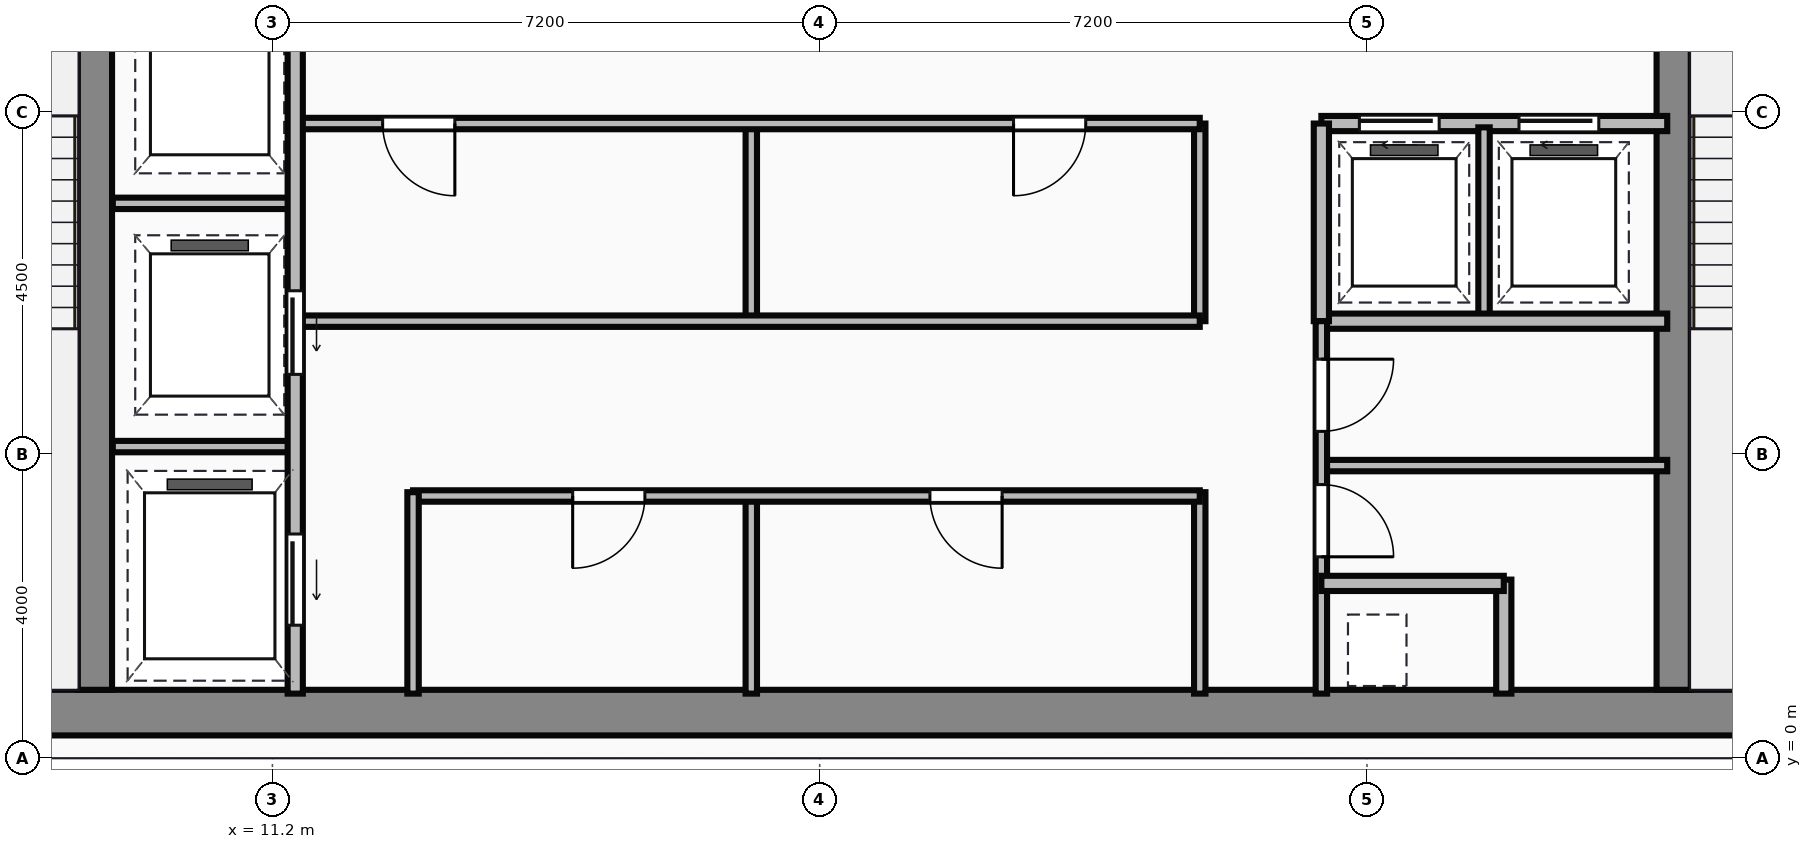
"""IFC4 building model, lengths in metres.
Left out: names, types, materials, properties, quantities, classifications, styles, units other than length and angle.
Written with IfcOpenShell. Run it as: python <this file> out.ifc"""

import sys

from ifc_helpers import new_model, si_unit, direction, frame, frame_2d, origin, place, context, subcontext, project, spatial, rectangle, extrude, source, transform, mapped, element, fill, save


model = new_model("IFC4")
c1 = context("Model", 3, precision=1e-05, world=origin(), true_north=direction((0.0, 1.0)))
c2 = subcontext(c1, "Body", "Model", "MODEL_VIEW")
j1 = project(units=[si_unit("LENGTHUNIT", "METRE"), si_unit("PLANEANGLEUNIT", "RADIAN")], contexts=[c1])
p1 = place(None, origin())
s1 = spatial("IfcSite", under=j1, at=p1, CompositionType="ELEMENT")
p2 = place(p1, origin())
s2 = spatial("IfcBuilding", under=s1, at=p2, CompositionType="ELEMENT")
p3 = place(p2, frame((0.0, 0.0, 203.2)))
s3 = spatial("IfcBuildingStorey", under=s2, at=p3, CompositionType="ELEMENT", Elevation=203.2)
m1 = source(origin(), c2, "Body", "SweptSolid", [
    extrude(rectangle(XDim=29.5, YDim=0.6, at=frame_2d((14.75, 0.0))), origin(), (0.0, 0.0, 1.0), 3.65),
])
p4 = place(p3, frame((4.5, 0.6, 0.0), z_axis=(0.0, 0.0, 1.0), x_axis=(1.0, 0.0, 0.0)))
e1 = element("IfcWall", 1, at=p4, inside=s3, PredefinedType="SHEAR", context=c2, shape_type="MappedRepresentation", body=[
    mapped(m1, transform((0.0, 0.0, 0.0))),
])
m2 = source(origin(), c2, "Body", "SweptSolid", [
    extrude(rectangle(XDim=12.5, YDim=0.45, at=frame_2d((6.25, 0.0))), origin(), (0.0, 0.0, 1.0), 3.65),
])
for number, where, z_axis, x_axis in (
    (2, (8.865, 0.9, 0.0), (0.0, 0.0, 1.0), (0.0, 1.0, 0.0)),
    (3, (29.635, 0.9, 0.0), (0.0, 0.0, 1.0), (0.0, 1.0, 0.0)),
):
    element("IfcWall", number, at=place(p3, frame(where, z_axis=z_axis, x_axis=x_axis)), inside=s3, PredefinedType="SHEAR", context=c2, shape_type="MappedRepresentation", body=[
        mapped(m2, transform((0.0, 0.0, 0.0))),
    ])
m3 = source(origin(), c2, "Body", "SweptSolid", [
    extrude(rectangle(XDim=9.6, YDim=0.2, at=frame_2d((4.8, 0.0))), origin(), (0.0, 0.0, 1.0), 3.4),
])
p5 = place(p3, frame((11.5, 0.85, 0.0), z_axis=(0.0, 0.0, 1.0), x_axis=(0.0, 1.0, 0.0)))
e4 = element("IfcWall", 4, at=p5, inside=s3, PredefinedType="PARTITIONING", context=c2, shape_type="MappedRepresentation", body=[
    mapped(m3, transform((0.0, 0.0, 0.0))),
])
p6 = place(p5, frame((4.2, 0.0, 0.0)))
e5 = element("IfcOpeningElement", 5, at=p6, cuts=e4, PredefinedType="OPENING", context=c2, shape_type="SweptSolid", body=[
    extrude(rectangle(XDim=1.1, YDim=2.15, at=frame_2d((0.55, 1.075))), frame((0.0, 0.11, 0.0), z_axis=(0.0, -1.0, 0.0), x_axis=(1.0, 0.0, 0.0)), (0.0, 0.0, 1.0), 0.22),
])
p7 = place(p5, frame((0.9, 0.0, 0.0)))
e6 = element("IfcOpeningElement", 6, at=p7, cuts=e4, PredefinedType="OPENING", context=c2, shape_type="SweptSolid", body=[
    extrude(rectangle(XDim=1.2, YDim=2.15, at=frame_2d((0.6, 1.075))), frame((0.0, 0.11, 0.0), z_axis=(0.0, -1.0, 0.0), x_axis=(1.0, 0.0, 0.0)), (0.0, 0.0, 1.0), 0.22),
])
m4 = source(origin(), c2, "Body", "SweptSolid", [
    extrude(rectangle(XDim=2.4, YDim=0.15, at=frame_2d((1.2, 0.0))), origin(), (0.0, 0.0, 1.0), 3.4),
])
for number, where, z_axis, x_axis in (
    (7, (9.1, 4.1, 0.0), (0.0, 0.0, 1.0), (1.0, 0.0, 0.0)),
    (8, (9.1, 7.3, 0.0), (0.0, 0.0, 1.0), (1.0, 0.0, 0.0)),
):
    element("IfcWall", number, at=place(p3, frame(where, z_axis=z_axis, x_axis=x_axis)), inside=s3, PredefinedType="PARTITIONING", context=c2, shape_type="MappedRepresentation", body=[
        mapped(m4, transform((0.0, 0.0, 0.0))),
    ])
m5 = source(origin(), c2, "Body", "SweptSolid", [
    extrude(rectangle(XDim=2.65, YDim=0.15, at=frame_2d((1.325, 0.0))), origin(), (0.0, 0.0, 1.0), 3.4),
])
p8 = place(p3, frame((13.05, 0.85, 0.0), z_axis=(0.0, 0.0, 1.0), x_axis=(0.0, 1.0, 0.0)))
e9 = element("IfcWall", 9, at=p8, inside=s3, PredefinedType="PARTITIONING", context=c2, shape_type="MappedRepresentation", body=[
    mapped(m5, transform((0.0, 0.0, 0.0))),
])
m6 = source(origin(), c2, "Body", "SweptSolid", [
    extrude(rectangle(XDim=10.35, YDim=0.15, at=frame_2d((5.175, 0.0))), origin(), (0.0, 0.0, 1.0), 3.4),
])
p9 = place(p3, frame((13.05, 3.45, 0.0), z_axis=(0.0, 0.0, 1.0), x_axis=(1.0, 0.0, 0.0)))
e10 = element("IfcWall", 10, at=p9, inside=s3, PredefinedType="PARTITIONING", context=c2, shape_type="MappedRepresentation", body=[
    mapped(m6, transform((0.0, 0.0, 0.0))),
])
p10 = place(p9, frame((2.1, 0.0, 0.0)))
e11 = element("IfcOpeningElement", 11, at=p10, cuts=e10, PredefinedType="OPENING", context=c2, shape_type="SweptSolid", body=[
    extrude(rectangle(XDim=0.95, YDim=2.15, at=frame_2d((0.475, 1.075))), frame((0.0, 0.085, 0.0), z_axis=(0.0, -1.0, 0.0), x_axis=(1.0, 0.0, 0.0)), (0.0, 0.0, 1.0), 0.17),
])
p11 = place(p9, frame((6.8, 0.0, 0.0)))
e12 = element("IfcOpeningElement", 12, at=p11, cuts=e10, PredefinedType="OPENING", context=c2, shape_type="SweptSolid", body=[
    extrude(rectangle(XDim=0.95, YDim=2.15, at=frame_2d((0.475, 1.075))), frame((0.0, 0.085, 0.0), z_axis=(0.0, -1.0, 0.0), x_axis=(1.0, 0.0, 0.0)), (0.0, 0.0, 1.0), 0.17),
])
p12 = place(p3, frame((23.4, 0.85, 0.0), z_axis=(0.0, 0.0, 1.0), x_axis=(0.0, 1.0, 0.0)))
e13 = element("IfcWall", 13, at=p12, inside=s3, PredefinedType="PARTITIONING", context=c2, shape_type="MappedRepresentation", body=[
    mapped(m5, transform((0.0, 0.0, 0.0))),
])
m7 = source(origin(), c2, "Body", "SweptSolid", [
    extrude(rectangle(XDim=2.6, YDim=0.15, at=frame_2d((1.3, 0.0))), origin(), (0.0, 0.0, 1.0), 3.4),
])
p13 = place(p3, frame((17.5, 0.85, 0.0), z_axis=(0.0, 0.0, 1.0), x_axis=(0.0, 1.0, 0.0)))
e14 = element("IfcWall", 14, at=p13, inside=s3, PredefinedType="PARTITIONING", context=c2, shape_type="MappedRepresentation", body=[
    mapped(m7, transform((0.0, 0.0, 0.0))),
])
m8 = source(origin(), c2, "Body", "SweptSolid", [
    extrude(rectangle(XDim=11.85, YDim=0.15, at=frame_2d((5.925, 0.0))), origin(), (0.0, 0.0, 1.0), 3.4),
])
p14 = place(p3, frame((11.55, 5.75, 0.0), z_axis=(0.0, 0.0, 1.0), x_axis=(1.0, 0.0, 0.0)))
e15 = element("IfcWall", 15, at=p14, inside=s3, PredefinedType="PARTITIONING", context=c2, shape_type="MappedRepresentation", body=[
    mapped(m8, transform((0.0, 0.0, 0.0))),
])
p15 = place(p3, frame((11.55, 8.35, 0.0), z_axis=(0.0, 0.0, 1.0), x_axis=(1.0, 0.0, 0.0)))
e16 = element("IfcWall", 16, at=p15, inside=s3, PredefinedType="PARTITIONING", context=c2, shape_type="MappedRepresentation", body=[
    mapped(m8, transform((0.0, 0.0, 0.0))),
])
p16 = place(p15, frame((1.1, 0.0, 0.0)))
e17 = element("IfcOpeningElement", 17, at=p16, cuts=e16, PredefinedType="OPENING", context=c2, shape_type="SweptSolid", body=[
    extrude(rectangle(XDim=0.95, YDim=2.15, at=frame_2d((0.475, 1.075))), frame((0.0, 0.085, 0.0), z_axis=(0.0, -1.0, 0.0), x_axis=(1.0, 0.0, 0.0)), (0.0, 0.0, 1.0), 0.17),
])
p17 = place(p15, frame((9.4, 0.0, 0.0)))
e18 = element("IfcOpeningElement", 18, at=p17, cuts=e16, PredefinedType="OPENING", context=c2, shape_type="SweptSolid", body=[
    extrude(rectangle(XDim=0.95, YDim=2.15, at=frame_2d((0.475, 1.075))), frame((0.0, 0.085, 0.0), z_axis=(0.0, -1.0, 0.0), x_axis=(1.0, 0.0, 0.0)), (0.0, 0.0, 1.0), 0.17),
])
m9 = source(origin(), c2, "Body", "SweptSolid", [
    extrude(rectangle(XDim=2.6, YDim=0.15, at=frame_2d((1.3, 0.0))), origin(), (0.0, 0.0, 1.0), 3.4),
])
p18 = place(p3, frame((23.4, 5.75, 0.0), z_axis=(0.0, 0.0, 1.0), x_axis=(0.0, 1.0, 0.0)))
e19 = element("IfcWall", 19, at=p18, inside=s3, PredefinedType="PARTITIONING", context=c2, shape_type="MappedRepresentation", body=[
    mapped(m9, transform((0.0, 0.0, 0.0))),
])
m10 = source(origin(), c2, "Body", "SweptSolid", [
    extrude(rectangle(XDim=2.5, YDim=0.15, at=frame_2d((1.25, 0.0))), origin(), (0.0, 0.0, 1.0), 3.4),
])
p19 = place(p3, frame((17.5, 5.8, 0.0), z_axis=(0.0, 0.0, 1.0), x_axis=(0.0, 1.0, 0.0)))
e20 = element("IfcWall", 20, at=p19, inside=s3, PredefinedType="PARTITIONING", context=c2, shape_type="MappedRepresentation", body=[
    mapped(m10, transform((0.0, 0.0, 0.0))),
])
m11 = source(origin(), c2, "Body", "SweptSolid", [
    extrude(rectangle(XDim=4.55, YDim=0.2, at=frame_2d((2.275, 0.0))), origin(), (0.0, 0.0, 1.0), 3.4),
])
p20 = place(p3, frame((25.0, 8.35, 0.0), z_axis=(0.0, 0.0, 1.0), x_axis=(1.0, 0.0, 0.0)))
e21 = element("IfcWall", 21, at=p20, inside=s3, PredefinedType="PARTITIONING", context=c2, shape_type="MappedRepresentation", body=[
    mapped(m11, transform((0.0, 0.0, 0.0))),
])
p21 = place(p20, frame((0.5, 0.0, 0.0)))
e22 = element("IfcOpeningElement", 22, at=p21, cuts=e21, PredefinedType="OPENING", context=c2, shape_type="SweptSolid", body=[
    extrude(rectangle(XDim=1.05, YDim=2.15, at=frame_2d((0.525, 1.075))), frame((0.0, 0.11, 0.0), z_axis=(0.0, -1.0, 0.0), x_axis=(1.0, 0.0, 0.0)), (0.0, 0.0, 1.0), 0.22),
])
p22 = place(p20, frame((2.6, 0.0, 0.0)))
e23 = element("IfcOpeningElement", 23, at=p22, cuts=e21, PredefinedType="OPENING", context=c2, shape_type="SweptSolid", body=[
    extrude(rectangle(XDim=1.05, YDim=2.15, at=frame_2d((0.525, 1.075))), frame((0.0, 0.11, 0.0), z_axis=(0.0, -1.0, 0.0), x_axis=(1.0, 0.0, 0.0)), (0.0, 0.0, 1.0), 0.22),
])
p23 = place(p3, frame((25.0, 5.75, 0.0), z_axis=(0.0, 0.0, 1.0), x_axis=(1.0, 0.0, 0.0)))
e24 = element("IfcWall", 24, at=p23, inside=s3, PredefinedType="PARTITIONING", context=c2, shape_type="MappedRepresentation", body=[
    mapped(m11, transform((0.0, 0.0, 0.0))),
])
m12 = source(origin(), c2, "Body", "SweptSolid", [
    extrude(rectangle(XDim=2.6, YDim=0.2, at=frame_2d((1.3, 0.0))), origin(), (0.0, 0.0, 1.0), 3.4),
])
p24 = place(p3, frame((25.0, 5.75, 0.0), z_axis=(0.0, 0.0, 1.0), x_axis=(0.0, 1.0, 0.0)))
e25 = element("IfcWall", 25, at=p24, inside=s3, PredefinedType="PARTITIONING", context=c2, shape_type="MappedRepresentation", body=[
    mapped(m12, transform((0.0, 0.0, 0.0))),
])
p25 = place(p3, frame((27.14, 5.8, 0.0), z_axis=(0.0, 0.0, 1.0), x_axis=(0.0, 1.0, 0.0)))
e26 = element("IfcWall", 26, at=p25, inside=s3, PredefinedType="PARTITIONING", context=c2, shape_type="MappedRepresentation", body=[
    mapped(m10, transform((0.0, 0.0, 0.0))),
])
m13 = source(origin(), c2, "Body", "SweptSolid", [
    extrude(rectangle(XDim=4.9, YDim=0.15, at=frame_2d((2.45, 0.0))), origin(), (0.0, 0.0, 1.0), 3.4),
])
p26 = place(p3, frame((25.0, 0.85, 0.0), z_axis=(0.0, 0.0, 1.0), x_axis=(0.0, 1.0, 0.0)))
e27 = element("IfcWall", 27, at=p26, inside=s3, PredefinedType="PARTITIONING", context=c2, shape_type="MappedRepresentation", body=[
    mapped(m13, transform((0.0, 0.0, 0.0))),
])
p27 = place(p26, frame((1.8, 0.0, 0.0)))
e28 = element("IfcOpeningElement", 28, at=p27, cuts=e27, PredefinedType="OPENING", context=c2, shape_type="SweptSolid", body=[
    extrude(rectangle(XDim=0.95, YDim=2.15, at=frame_2d((0.475, 1.075))), frame((0.0, 0.085, 0.0), z_axis=(0.0, -1.0, 0.0), x_axis=(1.0, 0.0, 0.0)), (0.0, 0.0, 1.0), 0.17),
])
p28 = place(p26, frame((3.45, 0.0, 0.0)))
e29 = element("IfcOpeningElement", 29, at=p28, cuts=e27, PredefinedType="OPENING", context=c2, shape_type="SweptSolid", body=[
    extrude(rectangle(XDim=0.95, YDim=2.15, at=frame_2d((0.475, 1.075))), frame((0.0, 0.085, 0.0), z_axis=(0.0, -1.0, 0.0), x_axis=(1.0, 0.0, 0.0)), (0.0, 0.0, 1.0), 0.17),
])
m14 = source(origin(), c2, "Body", "SweptSolid", [
    extrude(rectangle(XDim=2.4, YDim=0.2, at=frame_2d((1.2, 0.0))), origin(), (0.0, 0.0, 1.0), 3.4),
])
p29 = place(p3, frame((25.0, 2.3, 0.0), z_axis=(0.0, 0.0, 1.0), x_axis=(1.0, 0.0, 0.0)))
e30 = element("IfcWall", 30, at=p29, inside=s3, PredefinedType="PARTITIONING", context=c2, shape_type="MappedRepresentation", body=[
    mapped(m14, transform((0.0, 0.0, 0.0))),
])
m15 = source(origin(), c2, "Body", "SweptSolid", [
    extrude(rectangle(XDim=1.5, YDim=0.2, at=frame_2d((0.75, 0.0))), origin(), (0.0, 0.0, 1.0), 3.4),
])
p30 = place(p3, frame((27.4, 0.85, 0.0), z_axis=(0.0, 0.0, 1.0), x_axis=(0.0, 1.0, 0.0)))
e31 = element("IfcWall", 31, at=p30, inside=s3, PredefinedType="PARTITIONING", context=c2, shape_type="MappedRepresentation", body=[
    mapped(m15, transform((0.0, 0.0, 0.0))),
])
m16 = source(origin(), c2, "Body", "SweptSolid", [
    extrude(rectangle(XDim=4.55, YDim=0.15, at=frame_2d((2.275, 0.0))), origin(), (0.0, 0.0, 1.0), 3.4),
])
p31 = place(p3, frame((25.0, 3.85, 0.0), z_axis=(0.0, 0.0, 1.0), x_axis=(1.0, 0.0, 0.0)))
e32 = element("IfcWall", 32, at=p31, inside=s3, PredefinedType="PARTITIONING", context=c2, shape_type="MappedRepresentation", body=[
    mapped(m16, transform((0.0, 0.0, 0.0))),
])
m17 = source(origin(), c2, "Body", "SweptSolid", [
    extrude(rectangle(XDim=1.1, YDim=2.15, at=frame_2d((0.55, 1.075))), frame((0.0, 0.025, 0.0), z_axis=(0.0, -1.0, 0.0), x_axis=(1.0, 0.0, 0.0)), (0.0, 0.0, 1.0), 0.05),
])
p32 = place(p6, frame((1.1, 0.0, 0.0), z_axis=(0.0, 0.0, 1.0), x_axis=(-1.0, 0.0, 0.0)))
e33 = element("IfcDoor", 33, at=p32, inside=s3, OperationType="SLIDING_TO_LEFT", PredefinedType="DOOR", context=c2, shape_type="MappedRepresentation", body=[
    mapped(m17, transform((0.0, 0.0, 0.0))),
])
fill(e5, e33)
m18 = source(origin(), c2, "Body", "SweptSolid", [
    extrude(rectangle(XDim=1.2, YDim=2.15, at=frame_2d((0.6, 1.075))), frame((0.0, 0.025, 0.0), z_axis=(0.0, -1.0, 0.0), x_axis=(1.0, 0.0, 0.0)), (0.0, 0.0, 1.0), 0.05),
])
p33 = place(p7, frame((1.2, 0.0, 0.0), z_axis=(0.0, 0.0, 1.0), x_axis=(-1.0, 0.0, 0.0)))
e34 = element("IfcDoor", 34, at=p33, inside=s3, OperationType="SLIDING_TO_LEFT", PredefinedType="DOOR", context=c2, shape_type="MappedRepresentation", body=[
    mapped(m18, transform((0.0, 0.0, 0.0))),
])
fill(e6, e34)
m19 = source(origin(), c2, "Body", "SweptSolid", [
    extrude(rectangle(XDim=0.95, YDim=2.15, at=frame_2d((0.475, 1.075))), frame((0.0, 0.025, 0.0), z_axis=(0.0, -1.0, 0.0), x_axis=(1.0, 0.0, 0.0)), (0.0, 0.0, 1.0), 0.05),
])
p34 = place(p10, origin())
e35 = element("IfcDoor", 35, at=p34, inside=s3, OperationType="SINGLE_SWING_LEFT", PredefinedType="DOOR", context=c2, shape_type="MappedRepresentation", body=[
    mapped(m19, transform((0.0, 0.0, 0.0))),
])
fill(e11, e35)
p35 = place(p11, origin())
e36 = element("IfcDoor", 36, at=p35, inside=s3, OperationType="SINGLE_SWING_RIGHT", PredefinedType="DOOR", context=c2, shape_type="MappedRepresentation", body=[
    mapped(m19, transform((0.0, 0.0, 0.0))),
])
fill(e12, e36)
p36 = place(p16, origin())
e37 = element("IfcDoor", 37, at=p36, inside=s3, OperationType="SINGLE_SWING_RIGHT", PredefinedType="DOOR", context=c2, shape_type="MappedRepresentation", body=[
    mapped(m19, transform((0.0, 0.0, 0.0))),
])
fill(e17, e37)
p37 = place(p17, origin())
e38 = element("IfcDoor", 38, at=p37, inside=s3, OperationType="SINGLE_SWING_LEFT", PredefinedType="DOOR", context=c2, shape_type="MappedRepresentation", body=[
    mapped(m19, transform((0.0, 0.0, 0.0))),
])
fill(e18, e38)
m20 = source(origin(), c2, "Body", "SweptSolid", [
    extrude(rectangle(XDim=1.05, YDim=2.15, at=frame_2d((0.525, 1.075))), frame((0.0, 0.025, 0.0), z_axis=(0.0, -1.0, 0.0), x_axis=(1.0, 0.0, 0.0)), (0.0, 0.0, 1.0), 0.05),
])
p38 = place(p21, origin())
e39 = element("IfcDoor", 39, at=p38, inside=s3, OperationType="SLIDING_TO_LEFT", PredefinedType="DOOR", context=c2, shape_type="MappedRepresentation", body=[
    mapped(m20, transform((0.0, 0.0, 0.0))),
])
fill(e22, e39)
p39 = place(p22, origin())
e40 = element("IfcDoor", 40, at=p39, inside=s3, OperationType="SLIDING_TO_LEFT", PredefinedType="DOOR", context=c2, shape_type="MappedRepresentation", body=[
    mapped(m20, transform((0.0, 0.0, 0.0))),
])
fill(e23, e40)
p40 = place(p27, origin())
e41 = element("IfcDoor", 41, at=p40, inside=s3, OperationType="SINGLE_SWING_LEFT", PredefinedType="DOOR", context=c2, shape_type="MappedRepresentation", body=[
    mapped(m19, transform((0.0, 0.0, 0.0))),
])
fill(e28, e41)
p41 = place(p28, origin())
e42 = element("IfcDoor", 42, at=p41, inside=s3, OperationType="SINGLE_SWING_RIGHT", PredefinedType="DOOR", context=c2, shape_type="MappedRepresentation", body=[
    mapped(m19, transform((0.0, 0.0, 0.0))),
])
fill(e29, e42)
save(model, sys.argv[1])
